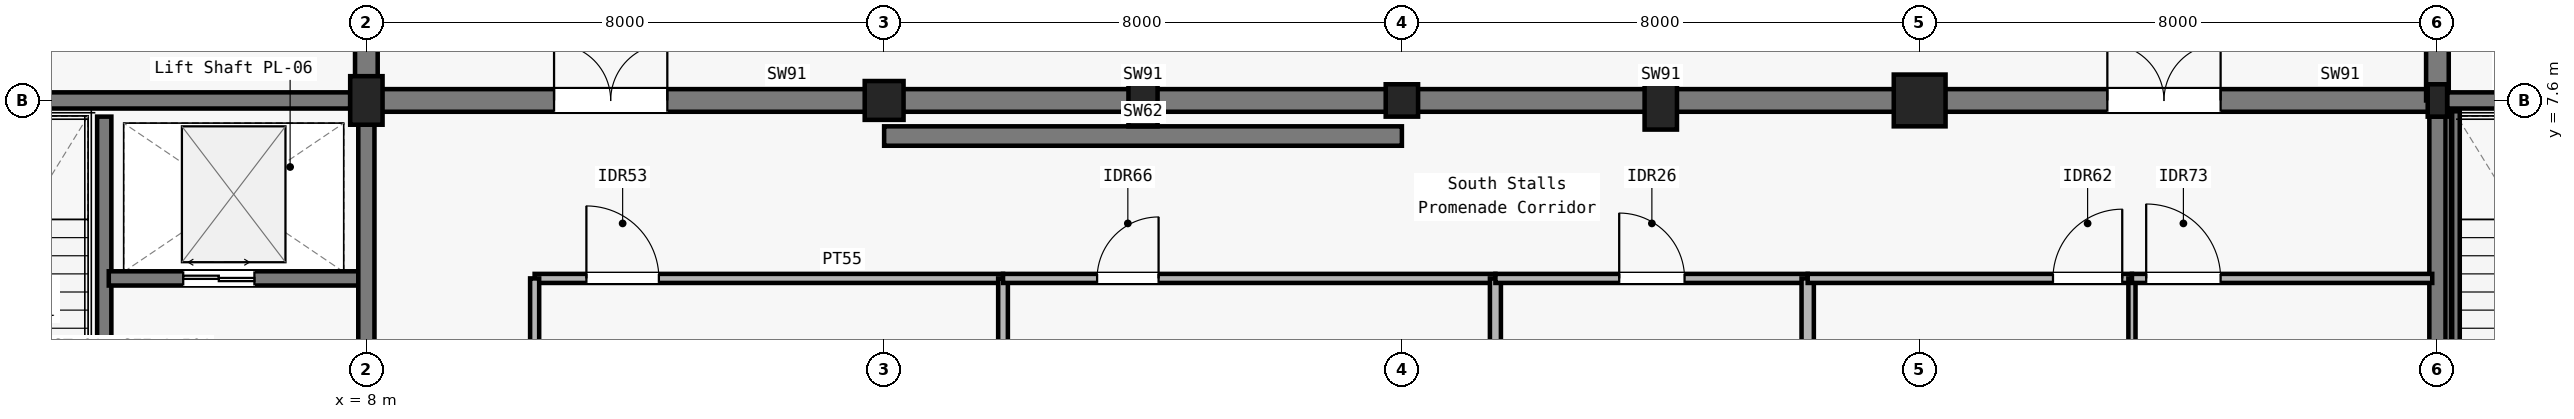
"""IFC4 building model, lengths in metres.
Left out: names, types, materials, properties, quantities, classifications, styles, units other than length and angle.
Written with IfcOpenShell. Run it as: python <this file> out.ifc"""

import sys

from ifc_helpers import new_model, si_unit, direction, frame, frame_2d, origin, origin_2d, place, context, subcontext, project, spatial, rectangle, circle, i_section, extrude, element, fill, save


model = new_model("IFC4")
c1 = context("Model", 3, precision=1e-05, world=origin(), true_north=direction((0.0, 1.0)))
c2 = subcontext(c1, "Body", "Model", "MODEL_VIEW")
j1 = project(units=[si_unit("LENGTHUNIT", "METRE"), si_unit("PLANEANGLEUNIT", "RADIAN")], contexts=[c1])
p1 = place(None, origin())
s1 = spatial("IfcSite", under=j1, at=p1, CompositionType="ELEMENT")
p2 = place(p1, origin())
s2 = spatial("IfcBuilding", under=s1, at=p2, CompositionType="ELEMENT")
p3 = place(p2, origin())
s3 = spatial("IfcBuildingStorey", under=s2, at=p3, CompositionType="ELEMENT", Elevation=0.0)
p4 = place(p3, frame((8.0, 7.6, 0.0), z_axis=(0.0, 0.0, 1.0), x_axis=(1.0, 0.0, 0.0)))
e1 = element("IfcColumn", 1, at=p4, inside=s3, PredefinedType="COLUMN", context=c2, shape_type="SweptSolid", body=[
    extrude(rectangle(XDim=0.5, YDim=0.75, at=origin_2d()), origin(), (0.0, 0.0, 1.0), 5.4),
])
p5 = place(p3, frame((16.0, 7.6, 0.0), z_axis=(0.0, 0.0, 1.0), x_axis=(1.0, 0.0, 0.0)))
e2 = element("IfcColumn", 2, at=p5, inside=s3, PredefinedType="COLUMN", context=c2, shape_type="SweptSolid", body=[
    extrude(rectangle(XDim=0.6, YDim=0.6, at=origin_2d()), origin(), (0.0, 0.0, 1.0), 5.4),
])
p6 = place(p3, frame((24.0, 7.6, 0.0), z_axis=(0.0, 0.0, 1.0), x_axis=(1.0, 0.0, 0.0)))
e3 = element("IfcColumn", 3, at=p6, inside=s3, PredefinedType="COLUMN", context=c2, shape_type="SweptSolid", body=[
    extrude(rectangle(XDim=0.5, YDim=0.5, at=origin_2d()), origin(), (0.0, 0.0, 1.0), 5.4),
])
p7 = place(p3, frame((32.0, 7.6, 0.0), z_axis=(0.0, 0.0, 1.0), x_axis=(1.0, 0.0, 0.0)))
e4 = element("IfcColumn", 4, at=p7, inside=s3, PredefinedType="COLUMN", context=c2, shape_type="SweptSolid", body=[
    extrude(circle(Radius=0.4, at=origin_2d()), origin(), (0.0, 0.0, 1.0), 5.4),
])
p8 = place(p3, frame((40.0, 7.6, 0.0), z_axis=(0.0, 0.0, 1.0), x_axis=(1.0, 0.0, 0.0)))
e5 = element("IfcColumn", 5, at=p8, inside=s3, PredefinedType="COLUMN", context=c2, shape_type="SweptSolid", body=[
    extrude(i_section(OverallWidth=0.3, OverallDepth=0.5, WebThickness=0.014, FlangeThickness=0.028, FilletRadius=0.027, at=origin_2d()), origin(), (0.0, 0.0, 1.0), 5.4),
])
p9 = place(p3, frame((20.0, 7.6, 0.0), z_axis=(0.0, 0.0, 1.0), x_axis=(1.0, 0.0, 0.0)))
e6 = element("IfcColumn", 6, at=p9, inside=s3, PredefinedType="PILASTER", context=c2, shape_type="SweptSolid", body=[
    extrude(rectangle(XDim=0.45, YDim=0.8, at=origin_2d()), origin(), (0.0, 0.0, 1.0), 5.4),
])
p10 = place(p3, frame((28.0, 7.6, 0.0), z_axis=(0.0, 0.0, 1.0), x_axis=(1.0, 0.0, 0.0)))
e7 = element("IfcColumn", 7, at=p10, inside=s3, PredefinedType="PILASTER", context=c2, shape_type="SweptSolid", body=[
    extrude(rectangle(XDim=0.5, YDim=0.9, at=origin_2d()), origin(), (0.0, 0.0, 1.0), 5.4),
])
p11 = place(p3, frame((8.0, 7.6, 0.0), z_axis=(0.0, 0.0, 1.0), x_axis=(1.0, 0.0, 0.0)))
e8 = element("IfcWall", 8, at=p11, inside=s3, PredefinedType="SHEAR", context=c2, shape_type="SweptSolid", body=[
    extrude(rectangle(XDim=8.0, YDim=0.35, at=frame_2d((4.0, 0.0))), origin(), (0.0, 0.0, 1.0), 5.1),
])
p12 = place(p11, frame((2.9, 0.0, 0.0)))
e9 = element("IfcOpeningElement", 9, at=p12, cuts=e8, PredefinedType="OPENING", context=c2, shape_type="SweptSolid", body=[
    extrude(rectangle(XDim=1.75, YDim=2.25, at=frame_2d((0.875, 1.125))), frame((0.0, 0.185, 0.0), z_axis=(0.0, -1.0, 0.0), x_axis=(1.0, 0.0, 0.0)), (0.0, 0.0, 1.0), 0.37),
])
for number, where, z_axis, x_axis in (
    (10, (16.0, 7.6, 0.0), (0.0, 0.0, 1.0), (1.0, 0.0, 0.0)),
    (11, (24.0, 7.6, 0.0), (0.0, 0.0, 1.0), (1.0, 0.0, 0.0)),
):
    element("IfcWall", number, at=place(p3, frame(where, z_axis=z_axis, x_axis=x_axis)), inside=s3, PredefinedType="SHEAR", context=c2, shape_type="SweptSolid", body=[
        extrude(rectangle(XDim=8.0, YDim=0.35, at=frame_2d((4.0, 0.0))), origin(), (0.0, 0.0, 1.0), 5.1),
    ])
p13 = place(p3, frame((32.0, 7.6, 0.0), z_axis=(0.0, 0.0, 1.0), x_axis=(1.0, 0.0, 0.0)))
e12 = element("IfcWall", 12, at=p13, inside=s3, PredefinedType="SHEAR", context=c2, shape_type="SweptSolid", body=[
    extrude(rectangle(XDim=8.0, YDim=0.35, at=frame_2d((4.0, 0.0))), origin(), (0.0, 0.0, 1.0), 5.1),
])
p14 = place(p13, frame((2.9, 0.0, 0.0)))
e13 = element("IfcOpeningElement", 13, at=p14, cuts=e12, PredefinedType="OPENING", context=c2, shape_type="SweptSolid", body=[
    extrude(rectangle(XDim=1.75, YDim=2.25, at=frame_2d((0.875, 1.125))), frame((0.0, 0.185, 0.0), z_axis=(0.0, -1.0, 0.0), x_axis=(1.0, 0.0, 0.0)), (0.0, 0.0, 1.0), 0.37),
])
for number, where, z_axis, x_axis in (
    (14, (8.0, 7.6, 0.0), (0.0, 0.0, 1.0), (0.0, 1.0, 0.0)),
    (15, (40.0, 7.6, 0.0), (0.0, 0.0, 1.0), (0.0, 1.0, 0.0)),
):
    element("IfcWall", number, at=place(p3, frame(where, z_axis=z_axis, x_axis=x_axis)), inside=s3, PredefinedType="SHEAR", context=c2, shape_type="SweptSolid", body=[
        extrude(rectangle(XDim=7.6, YDim=0.35, at=frame_2d((3.8, 0.0))), origin(), (0.0, 0.0, 1.0), 5.1),
    ])
p15 = place(p3, frame((16.0, 7.05, 0.0), z_axis=(0.0, 0.0, 1.0), x_axis=(1.0, 0.0, 0.0)))
e16 = element("IfcWall", 16, at=p15, inside=s3, PredefinedType="SHEAR", context=c2, shape_type="SweptSolid", body=[
    extrude(rectangle(XDim=8.0, YDim=0.3, at=frame_2d((4.0, 0.0))), origin(), (0.0, 0.0, 1.0), 5.1),
])
p16 = place(p3, frame((0.3, 7.6, 0.0), z_axis=(0.0, 0.0, 1.0), x_axis=(1.0, 0.0, 0.0)))
e17 = element("IfcWall", 17, at=p16, inside=s3, PredefinedType="SOLIDWALL", context=c2, shape_type="SweptSolid", body=[
    extrude(rectangle(XDim=7.45, YDim=0.25, at=frame_2d((3.725, 0.0))), origin(), (0.0, 0.0, 1.0), 4.455),
])
p17 = place(p3, frame((3.95, 0.25, 0.0), z_axis=(0.0, 0.0, 1.0), x_axis=(0.0, 1.0, 0.0)))
e18 = element("IfcWall", 18, at=p17, inside=s3, PredefinedType="SOLIDWALL", context=c2, shape_type="SweptSolid", body=[
    extrude(rectangle(XDim=7.1, YDim=0.22, at=frame_2d((3.55, 0.0))), origin(), (0.0, 0.0, 1.0), 5.1),
])
p18 = place(p17, frame((0.35, 0.0, 0.0)))
e19 = element("IfcOpeningElement", 19, at=p18, cuts=e18, PredefinedType="OPENING", context=c2, shape_type="SweptSolid", body=[
    extrude(rectangle(XDim=1.2, YDim=2.15, at=frame_2d((0.6, 1.075))), frame((0.0, 0.12, 0.0), z_axis=(0.0, -1.0, 0.0), x_axis=(1.0, 0.0, 0.0)), (0.0, 0.0, 1.0), 0.24),
])
p19 = place(p3, frame((4.02, 4.85, 0.0), z_axis=(0.0, 0.0, 1.0), x_axis=(1.0, 0.0, 0.0)))
e20 = element("IfcWall", 20, at=p19, inside=s3, PredefinedType="SOLIDWALL", context=c2, shape_type="SweptSolid", body=[
    extrude(rectangle(XDim=3.93, YDim=0.22, at=frame_2d((1.965, 0.0))), origin(), (0.0, 0.0, 1.0), 4.475),
])
p20 = place(p19, frame((1.15, 0.0, 0.0)))
e21 = element("IfcOpeningElement", 21, at=p20, cuts=e20, PredefinedType="OPENING", context=c2, shape_type="SweptSolid", body=[
    extrude(rectangle(XDim=1.1, YDim=2.2, at=frame_2d((0.55, 1.1))), frame((0.0, 0.12, 0.0), z_axis=(0.0, -1.0, 0.0), x_axis=(1.0, 0.0, 0.0)), (0.0, 0.0, 1.0), 0.24),
])
p21 = place(p3, frame((8.0, 0.45, 0.0), z_axis=(0.0, 0.0, 1.0), x_axis=(0.0, 1.0, 0.0)))
e22 = element("IfcWall", 22, at=p21, inside=s3, PredefinedType="SOLIDWALL", context=c2, shape_type="SweptSolid", body=[
    extrude(rectangle(XDim=6.775, YDim=0.25, at=frame_2d((3.388, 0.0))), origin(), (0.0, 0.0, 1.0), 4.455),
])
p22 = place(p21, frame((1.9, 0.0, 0.0)))
e23 = element("IfcOpeningElement", 23, at=p22, cuts=e22, PredefinedType="OPENING", context=c2, shape_type="SweptSolid", body=[
    extrude(rectangle(XDim=1.35, YDim=2.2, at=frame_2d((0.675, 1.1))), frame((0.0, 0.135, 0.0), z_axis=(0.0, -1.0, 0.0), x_axis=(1.0, 0.0, 0.0)), (0.0, 0.0, 1.0), 0.27),
])
p23 = place(p3, frame((40.0, 0.25, 0.0), z_axis=(0.0, 0.0, 1.0), x_axis=(0.0, 1.0, 0.0)))
e24 = element("IfcWall", 24, at=p23, inside=s3, PredefinedType="SOLIDWALL", context=c2, shape_type="SweptSolid", body=[
    extrude(rectangle(XDim=7.1, YDim=0.25, at=frame_2d((3.55, 0.0))), origin(), (0.0, 0.0, 1.0), 3.99),
])
p24 = place(p3, frame((40.15, 7.6, 0.0), z_axis=(0.0, 0.0, 1.0), x_axis=(1.0, 0.0, 0.0)))
e25 = element("IfcWall", 25, at=p24, inside=s3, PredefinedType="SOLIDWALL", context=c2, shape_type="SweptSolid", body=[
    extrude(rectangle(XDim=7.77, YDim=0.25, at=frame_2d((3.885, 0.0))), origin(), (0.0, 0.0, 1.0), 3.99),
])
p25 = place(p3, frame((10.6, 4.85, 0.0), z_axis=(0.0, 0.0, 1.0), x_axis=(1.0, 0.0, 0.0)))
e26 = element("IfcWall", 26, at=p25, inside=s3, PredefinedType="PARTITIONING", context=c2, shape_type="SweptSolid", body=[
    extrude(rectangle(XDim=7.237, YDim=0.14, at=frame_2d((3.618, 0.0))), origin(), (0.0, 0.0, 1.0), 4.455),
])
p26 = place(p25, frame((0.8, 0.0, 0.0)))
e27 = element("IfcOpeningElement", 27, at=p26, cuts=e26, PredefinedType="OPENING", context=c2, shape_type="SweptSolid", body=[
    extrude(rectangle(XDim=1.12, YDim=2.1, at=frame_2d((0.56, 1.05))), frame((0.0, 0.08, 0.0), z_axis=(0.0, -1.0, 0.0), x_axis=(1.0, 0.0, 0.0)), (0.0, 0.0, 1.0), 0.16),
])
p27 = place(p3, frame((17.837, 0.08, 0.0), z_axis=(0.0, 0.0, 1.0), x_axis=(0.0, 1.0, 0.0)))
e28 = element("IfcWall", 28, at=p27, inside=s3, PredefinedType="PARTITIONING", context=c2, shape_type="SweptSolid", body=[
    extrude(rectangle(XDim=4.77, YDim=0.15, at=frame_2d((2.385, 0.0))), origin(), (0.0, 0.0, 1.0), 4.35),
])
p28 = place(p3, frame((17.837, 4.85, 0.0), z_axis=(0.0, 0.0, 1.0), x_axis=(1.0, 0.0, 0.0)))
e29 = element("IfcWall", 29, at=p28, inside=s3, PredefinedType="PARTITIONING", context=c2, shape_type="SweptSolid", body=[
    extrude(rectangle(XDim=7.608, YDim=0.14, at=frame_2d((3.804, 0.0))), origin(), (0.0, 0.0, 1.0), 4.43),
])
p29 = place(p28, frame((1.454, 0.0, 0.0)))
e30 = element("IfcOpeningElement", 30, at=p29, cuts=e29, PredefinedType="OPENING", context=c2, shape_type="SweptSolid", body=[
    extrude(rectangle(XDim=0.95, YDim=2.15, at=frame_2d((0.475, 1.075))), frame((0.0, 0.08, 0.0), z_axis=(0.0, -1.0, 0.0), x_axis=(1.0, 0.0, 0.0)), (0.0, 0.0, 1.0), 0.16),
])
p30 = place(p3, frame((25.445, 0.08, 0.0), z_axis=(0.0, 0.0, 1.0), x_axis=(0.0, 1.0, 0.0)))
e31 = element("IfcWall", 31, at=p30, inside=s3, PredefinedType="PARTITIONING", context=c2, shape_type="SweptSolid", body=[
    extrude(rectangle(XDim=4.77, YDim=0.17, at=frame_2d((2.385, 0.0))), origin(), (0.0, 0.0, 1.0), 4.325),
])
p31 = place(p3, frame((25.445, 4.85, 0.0), z_axis=(0.0, 0.0, 1.0), x_axis=(1.0, 0.0, 0.0)))
e32 = element("IfcWall", 32, at=p31, inside=s3, PredefinedType="PARTITIONING", context=c2, shape_type="SweptSolid", body=[
    extrude(rectangle(XDim=4.825, YDim=0.14, at=frame_2d((2.413, 0.0))), origin(), (0.0, 0.0, 1.0), 4.515),
])
p32 = place(p31, frame((1.913, 0.0, 0.0)))
e33 = element("IfcOpeningElement", 33, at=p32, cuts=e32, PredefinedType="OPENING", context=c2, shape_type="SweptSolid", body=[
    extrude(rectangle(XDim=1.01, YDim=2.15, at=frame_2d((0.505, 1.075))), frame((0.0, 0.08, 0.0), z_axis=(0.0, -1.0, 0.0), x_axis=(1.0, 0.0, 0.0)), (0.0, 0.0, 1.0), 0.16),
])
p33 = place(p3, frame((30.27, 0.08, 0.0), z_axis=(0.0, 0.0, 1.0), x_axis=(0.0, 1.0, 0.0)))
e34 = element("IfcWall", 34, at=p33, inside=s3, PredefinedType="PARTITIONING", context=c2, shape_type="SweptSolid", body=[
    extrude(rectangle(XDim=4.77, YDim=0.19, at=frame_2d((2.385, 0.0))), origin(), (0.0, 0.0, 1.0), 4.325),
])
p34 = place(p3, frame((30.27, 4.85, 0.0), z_axis=(0.0, 0.0, 1.0), x_axis=(1.0, 0.0, 0.0)))
e35 = element("IfcWall", 35, at=p34, inside=s3, PredefinedType="PARTITIONING", context=c2, shape_type="SweptSolid", body=[
    extrude(rectangle(XDim=5.01, YDim=0.14, at=frame_2d((2.505, 0.0))), origin(), (0.0, 0.0, 1.0), 4.325),
])
p35 = place(p34, frame((3.79, 0.0, 0.0)))
e36 = element("IfcOpeningElement", 36, at=p35, cuts=e35, PredefinedType="OPENING", context=c2, shape_type="SweptSolid", body=[
    extrude(rectangle(XDim=1.07, YDim=2.15, at=frame_2d((0.535, 1.075))), frame((0.0, 0.08, 0.0), z_axis=(0.0, -1.0, 0.0), x_axis=(1.0, 0.0, 0.0)), (0.0, 0.0, 1.0), 0.16),
])
p36 = place(p3, frame((35.28, 0.08, 0.0), z_axis=(0.0, 0.0, 1.0), x_axis=(0.0, 1.0, 0.0)))
e37 = element("IfcWall", 37, at=p36, inside=s3, PredefinedType="PARTITIONING", context=c2, shape_type="SweptSolid", body=[
    extrude(rectangle(XDim=4.77, YDim=0.11, at=frame_2d((2.385, 0.0))), origin(), (0.0, 0.0, 1.0), 4.495),
])
p37 = place(p3, frame((35.28, 4.85, 0.0), z_axis=(0.0, 0.0, 1.0), x_axis=(1.0, 0.0, 0.0)))
e38 = element("IfcWall", 38, at=p37, inside=s3, PredefinedType="PARTITIONING", context=c2, shape_type="SweptSolid", body=[
    extrude(rectangle(XDim=4.64, YDim=0.14, at=frame_2d((2.32, 0.0))), origin(), (0.0, 0.0, 1.0), 4.275),
])
p38 = place(p37, frame((0.22, 0.0, 0.0)))
e39 = element("IfcOpeningElement", 39, at=p38, cuts=e38, PredefinedType="OPENING", context=c2, shape_type="SweptSolid", body=[
    extrude(rectangle(XDim=1.15, YDim=2.15, at=frame_2d((0.575, 1.075))), frame((0.0, 0.08, 0.0), z_axis=(0.0, -1.0, 0.0), x_axis=(1.0, 0.0, 0.0)), (0.0, 0.0, 1.0), 0.16),
])
p39 = place(p3, frame((10.6, 0.08, 0.0), z_axis=(0.0, 0.0, 1.0), x_axis=(0.0, 1.0, 0.0)))
e40 = element("IfcWall", 40, at=p39, inside=s3, PredefinedType="PARTITIONING", context=c2, shape_type="SweptSolid", body=[
    extrude(rectangle(XDim=4.77, YDim=0.14, at=frame_2d((2.385, 0.0))), origin(), (0.0, 0.0, 1.0), 4.47),
])
p40 = place(p3, frame((40.275, 0.15, 0.0), z_axis=(0.0, 0.0, 1.0), x_axis=(0.0, 1.0, 0.0)))
e41 = element("IfcWall", 41, at=p40, inside=s3, PredefinedType="SOLIDWALL", context=c2, shape_type="SweptSolid", body=[
    extrude(rectangle(XDim=7.3, YDim=0.14, at=frame_2d((3.65, 0.0))), origin(), (0.0, 0.0, 1.0), 5.1),
])
p41 = place(p20, origin())
e42 = element("IfcDoor", 42, at=p41, inside=s3, OperationType="DOUBLE_DOOR_SLIDING", PredefinedType="DOOR", context=c2, shape_type="SweptSolid", body=[
    extrude(rectangle(XDim=1.1, YDim=2.2, at=frame_2d((0.55, 1.1))), frame((0.0, 0.025, 0.0), z_axis=(0.0, -1.0, 0.0), x_axis=(1.0, 0.0, 0.0)), (0.0, 0.0, 1.0), 0.05),
])
fill(e21, e42)
p42 = place(p26, origin())
e43 = element("IfcDoor", 43, at=p42, inside=s3, OperationType="SINGLE_SWING_LEFT", PredefinedType="DOOR", context=c2, shape_type="SweptSolid", body=[
    extrude(rectangle(XDim=1.12, YDim=2.1, at=frame_2d((0.56, 1.05))), frame((0.0, 0.025, 0.0), z_axis=(0.0, -1.0, 0.0), x_axis=(1.0, 0.0, 0.0)), (0.0, 0.0, 1.0), 0.05),
])
fill(e27, e43)
p43 = place(p29, origin())
e44 = element("IfcDoor", 44, at=p43, inside=s3, OperationType="SINGLE_SWING_RIGHT", PredefinedType="DOOR", context=c2, shape_type="SweptSolid", body=[
    extrude(rectangle(XDim=0.95, YDim=2.15, at=frame_2d((0.475, 1.075))), frame((0.0, 0.025, 0.0), z_axis=(0.0, -1.0, 0.0), x_axis=(1.0, 0.0, 0.0)), (0.0, 0.0, 1.0), 0.05),
])
fill(e30, e44)
p44 = place(p32, origin())
e45 = element("IfcDoor", 45, at=p44, inside=s3, OperationType="SINGLE_SWING_LEFT", PredefinedType="DOOR", context=c2, shape_type="SweptSolid", body=[
    extrude(rectangle(XDim=1.01, YDim=2.15, at=frame_2d((0.505, 1.075))), frame((0.0, 0.025, 0.0), z_axis=(0.0, -1.0, 0.0), x_axis=(1.0, 0.0, 0.0)), (0.0, 0.0, 1.0), 0.05),
])
fill(e33, e45)
p45 = place(p35, origin())
e46 = element("IfcDoor", 46, at=p45, inside=s3, OperationType="SINGLE_SWING_RIGHT", PredefinedType="DOOR", context=c2, shape_type="SweptSolid", body=[
    extrude(rectangle(XDim=1.07, YDim=2.15, at=frame_2d((0.535, 1.075))), frame((0.0, 0.025, 0.0), z_axis=(0.0, -1.0, 0.0), x_axis=(1.0, 0.0, 0.0)), (0.0, 0.0, 1.0), 0.05),
])
fill(e36, e46)
p46 = place(p38, origin())
e47 = element("IfcDoor", 47, at=p46, inside=s3, OperationType="SINGLE_SWING_LEFT", PredefinedType="DOOR", context=c2, shape_type="SweptSolid", body=[
    extrude(rectangle(XDim=1.15, YDim=2.15, at=frame_2d((0.575, 1.075))), frame((0.0, 0.025, 0.0), z_axis=(0.0, -1.0, 0.0), x_axis=(1.0, 0.0, 0.0)), (0.0, 0.0, 1.0), 0.05),
])
fill(e39, e47)
p47 = place(p12, origin())
e48 = element("IfcDoor", 48, at=p47, inside=s3, OperationType="DOUBLE_DOOR_SINGLE_SWING", PredefinedType="DOOR", context=c2, shape_type="SweptSolid", body=[
    extrude(rectangle(XDim=1.75, YDim=2.25, at=frame_2d((0.875, 1.125))), frame((0.0, 0.025, 0.0), z_axis=(0.0, -1.0, 0.0), x_axis=(1.0, 0.0, 0.0)), (0.0, 0.0, 1.0), 0.05),
])
fill(e9, e48)
p48 = place(p14, origin())
e49 = element("IfcDoor", 49, at=p48, inside=s3, OperationType="DOUBLE_DOOR_SINGLE_SWING", PredefinedType="DOOR", context=c2, shape_type="SweptSolid", body=[
    extrude(rectangle(XDim=1.75, YDim=2.25, at=frame_2d((0.875, 1.125))), frame((0.0, 0.025, 0.0), z_axis=(0.0, -1.0, 0.0), x_axis=(1.0, 0.0, 0.0)), (0.0, 0.0, 1.0), 0.05),
])
fill(e13, e49)
save(model, sys.argv[1])
